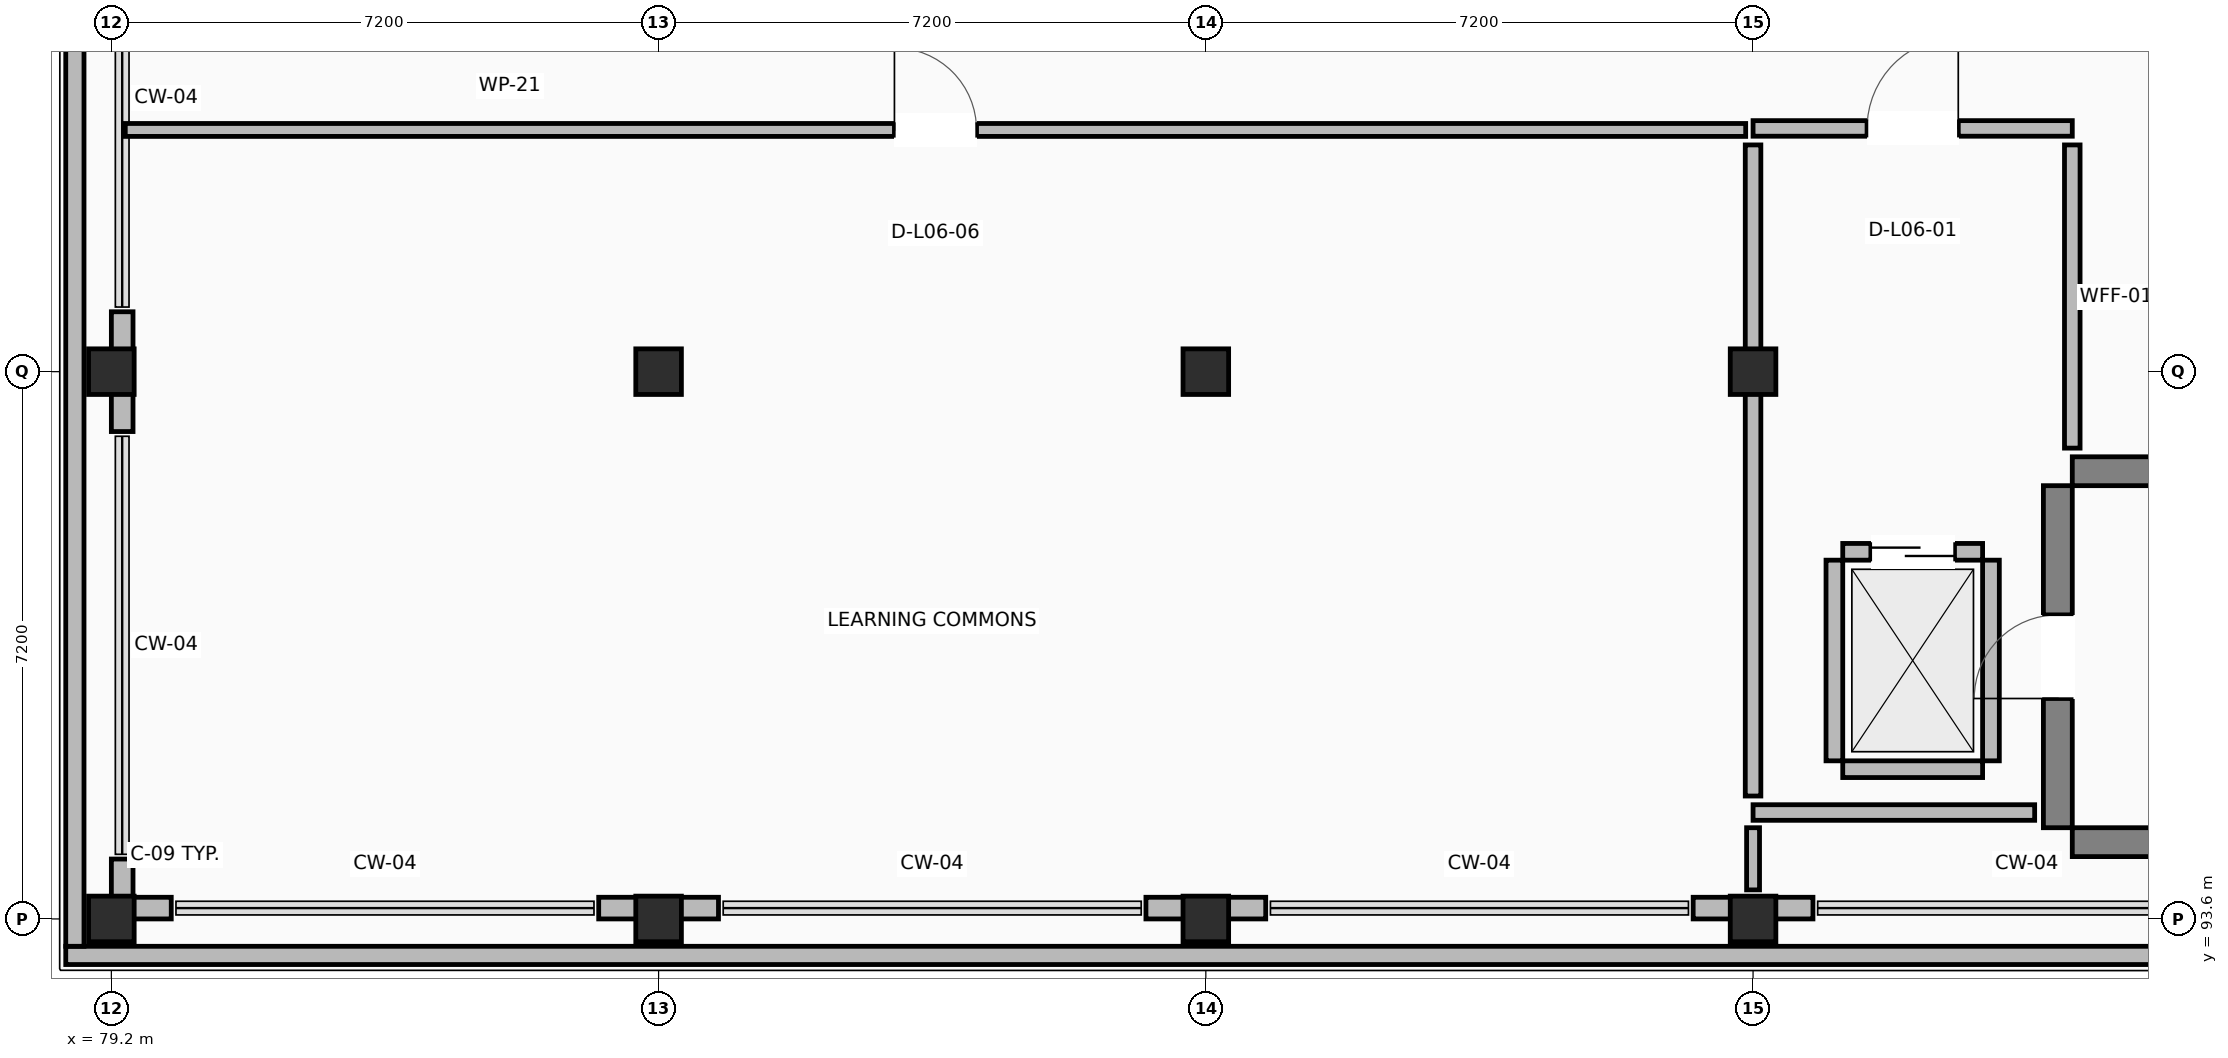
"""IFC4 building model, lengths in metres.
Left out: names, types, materials, properties, quantities, classifications, styles, units other than length and angle.
Written with IfcOpenShell. Run it as: python <this file> out.ifc"""

import sys

from ifc_helpers import new_model, si_unit, direction, frame, frame_2d, origin, origin_2d, place, context, subcontext, project, spatial, rectangle, extrude, element, fill, save


model = new_model("IFC4")
c1 = context("Model", 3, precision=1e-05, world=origin(), true_north=direction((0.0, 1.0)))
c2 = subcontext(c1, "Body", "Model", "MODEL_VIEW")
j1 = project(units=[si_unit("LENGTHUNIT", "METRE"), si_unit("PLANEANGLEUNIT", "RADIAN")], contexts=[c1])
p1 = place(None, origin())
s1 = spatial("IfcSite", under=j1, at=p1, CompositionType="ELEMENT")
p2 = place(p1, origin())
s2 = spatial("IfcBuilding", under=s1, at=p2, CompositionType="ELEMENT")
p3 = place(p2, frame((0.0, 0.0, 27.0)))
s3 = spatial("IfcBuildingStorey", under=s2, at=p3, CompositionType="ELEMENT", Elevation=27.0)
for number, where, z_axis, x_axis in (
    (1, (79.2, 93.6, 0.0), (0.0, 0.0, 1.0), (1.0, 0.0, 0.0)),
    (2, (79.2, 100.8, 0.0), (0.0, 0.0, 1.0), (1.0, 0.0, 0.0)),
    (3, (86.4, 93.6, 0.0), (0.0, 0.0, 1.0), (1.0, 0.0, 0.0)),
    (4, (86.4, 100.8, 0.0), (0.0, 0.0, 1.0), (1.0, 0.0, 0.0)),
    (5, (93.6, 93.6, 0.0), (0.0, 0.0, 1.0), (1.0, 0.0, 0.0)),
    (6, (93.6, 100.8, 0.0), (0.0, 0.0, 1.0), (1.0, 0.0, 0.0)),
    (7, (100.8, 93.6, 0.0), (0.0, 0.0, 1.0), (1.0, 0.0, 0.0)),
    (8, (100.8, 100.8, 0.0), (0.0, 0.0, 1.0), (1.0, 0.0, 0.0)),
):
    element("IfcColumn", number, at=place(p3, frame(where, z_axis=z_axis, x_axis=x_axis)), inside=s3, PredefinedType="COLUMN", context=c2, shape_type="SweptSolid", body=[
        extrude(rectangle(XDim=0.6, YDim=0.6, at=origin_2d()), origin(), (0.0, 0.0, 1.0), 3.92),
    ])
for number, where, z_axis, x_axis in (
    (9, (105.0, 94.61, 0.0), (0.0, 0.0, 1.0), (1.0, 0.0, 0.0)),
    (10, (105.0, 99.49, 0.0), (0.0, 0.0, 1.0), (1.0, 0.0, 0.0)),
):
    element("IfcWall", number, at=place(p3, frame(where, z_axis=z_axis, x_axis=x_axis)), inside=s3, PredefinedType="SHEAR", context=c2, shape_type="SweptSolid", body=[
        extrude(rectangle(XDim=9.5, YDim=0.38, at=frame_2d((4.75, 0.0))), origin(), (0.0, 0.0, 1.0), 3.92),
    ])
p4 = place(p3, frame((104.81, 94.8, 0.0), z_axis=(0.0, 0.0, 1.0), x_axis=(0.0, 1.0, 0.0)))
e11 = element("IfcWall", 11, at=p4, inside=s3, PredefinedType="SHEAR", context=c2, shape_type="SweptSolid", body=[
    extrude(rectangle(XDim=4.5, YDim=0.38, at=frame_2d((2.25, 0.0))), origin(), (0.0, 0.0, 1.0), 3.92),
])
p5 = place(p4, frame((1.7, 0.0, 0.0)))
e12 = element("IfcOpeningElement", 12, at=p5, cuts=e11, PredefinedType="OPENING", context=c2, shape_type="SweptSolid", body=[
    extrude(rectangle(XDim=1.1, YDim=2.15, at=frame_2d((0.55, 1.075))), frame((0.0, 0.2, 0.0), z_axis=(0.0, -1.0, 0.0), x_axis=(1.0, 0.0, 0.0)), (0.0, 0.0, 1.0), 0.4),
])
p6 = place(p3, frame((79.343, 101.588, 0.0), z_axis=(0.0, 0.0, 1.0), x_axis=(0.0, -1.0, 0.0)))
e13 = element("IfcWall", 13, at=p6, inside=s3, PredefinedType="STANDARD", context=c2, shape_type="SweptSolid", body=[
    extrude(rectangle(XDim=1.576, YDim=0.285, at=frame_2d((0.788, 0.0))), origin(), (0.0, 0.0, 1.0), 2.96),
])
p7 = place(p3, frame((79.343, 94.388, 0.0), z_axis=(0.0, 0.0, 1.0), x_axis=(0.0, -1.0, 0.0)))
e14 = element("IfcWall", 14, at=p7, inside=s3, PredefinedType="STANDARD", context=c2, shape_type="SweptSolid", body=[
    extrude(rectangle(XDim=0.503, YDim=0.285, at=frame_2d((0.251, 0.0))), origin(), (0.0, 0.0, 1.0), 2.96),
])
p8 = place(p3, frame((79.2, 93.742, 0.0), z_axis=(0.0, 0.0, 1.0), x_axis=(1.0, 0.0, 0.0)))
e15 = element("IfcWall", 15, at=p8, inside=s3, PredefinedType="STANDARD", context=c2, shape_type="SweptSolid", body=[
    extrude(rectangle(XDim=0.788, YDim=0.285, at=frame_2d((0.394, 0.0))), origin(), (0.0, 0.0, 1.0), 2.96),
])
for number, where, z_axis, x_axis in (
    (16, (85.612, 93.742, 0.0), (0.0, 0.0, 1.0), (1.0, 0.0, 0.0)),
    (17, (92.812, 93.742, 0.0), (0.0, 0.0, 1.0), (1.0, 0.0, 0.0)),
    (18, (100.012, 93.742, 0.0), (0.0, 0.0, 1.0), (1.0, 0.0, 0.0)),
):
    element("IfcWall", number, at=place(p3, frame(where, z_axis=z_axis, x_axis=x_axis)), inside=s3, PredefinedType="STANDARD", context=c2, shape_type="SweptSolid", body=[
        extrude(rectangle(XDim=1.576, YDim=0.285, at=frame_2d((0.788, 0.0))), origin(), (0.0, 0.0, 1.0), 2.96),
    ])
p9 = place(p3, frame((136.44, 93.12, 0.0), z_axis=(0.0, 0.0, 1.0), x_axis=(-1.0, 0.0, 0.0)))
e19 = element("IfcWall", 19, at=p9, inside=s3, PredefinedType="PARAPET", context=c2, shape_type="SweptSolid", body=[
    extrude(rectangle(XDim=57.84, YDim=0.24, at=frame_2d((28.92, 0.0))), origin(), (0.0, 0.0, 1.0), 1.12),
])
p10 = place(p3, frame((78.72, 93.24, 0.0), z_axis=(0.0, 0.0, 1.0), x_axis=(0.0, 1.0, 0.0)))
e20 = element("IfcWall", 20, at=p10, inside=s3, PredefinedType="PARAPET", context=c2, shape_type="SweptSolid", body=[
    extrude(rectangle(XDim=22.32, YDim=0.24, at=frame_2d((11.16, 0.0))), origin(), (0.0, 0.0, 1.0), 1.12),
])
p11 = place(p3, frame((101.98, 95.57, 0.0), z_axis=(0.0, 0.0, 1.0), x_axis=(1.0, 0.0, 0.0)))
e21 = element("IfcWall", 21, at=p11, inside=s3, PredefinedType="STANDARD", context=c2, shape_type="SweptSolid", body=[
    extrude(rectangle(XDim=1.84, YDim=0.22, at=frame_2d((0.92, 0.0))), origin(), (0.0, 0.0, 1.0), 2.96),
])
p12 = place(p3, frame((101.98, 98.43, 0.0), z_axis=(0.0, 0.0, 1.0), x_axis=(1.0, 0.0, 0.0)))
e22 = element("IfcWall", 22, at=p12, inside=s3, PredefinedType="STANDARD", context=c2, shape_type="SweptSolid", body=[
    extrude(rectangle(XDim=1.84, YDim=0.22, at=frame_2d((0.92, 0.0))), origin(), (0.0, 0.0, 1.0), 2.96),
])
p13 = place(p12, frame((0.37, 0.0, 0.0)))
e23 = element("IfcOpeningElement", 23, at=p13, cuts=e22, PredefinedType="OPENING", context=c2, shape_type="SweptSolid", body=[
    extrude(rectangle(XDim=1.1, YDim=2.15, at=frame_2d((0.55, 1.075))), frame((0.0, 0.12, 0.0), z_axis=(0.0, -1.0, 0.0), x_axis=(1.0, 0.0, 0.0)), (0.0, 0.0, 1.0), 0.24),
])
for number, where, z_axis, x_axis in (
    (24, (101.87, 95.68, 0.0), (0.0, 0.0, 1.0), (0.0, 1.0, 0.0)),
    (25, (103.93, 95.68, 0.0), (0.0, 0.0, 1.0), (0.0, 1.0, 0.0)),
):
    element("IfcWall", number, at=place(p3, frame(where, z_axis=z_axis, x_axis=x_axis)), inside=s3, PredefinedType="STANDARD", context=c2, shape_type="SweptSolid", body=[
        extrude(rectangle(XDim=2.64, YDim=0.22, at=frame_2d((1.32, 0.0))), origin(), (0.0, 0.0, 1.0), 2.96),
    ])
p14 = place(p3, frame((100.8, 104.0, 0.0), z_axis=(0.0, 0.0, 1.0), x_axis=(1.0, 0.0, 0.0)))
e26 = element("IfcWall", 26, at=p14, inside=s3, PredefinedType="PARTITIONING", context=c2, shape_type="SweptSolid", body=[
    extrude(rectangle(XDim=4.2, YDim=0.205, at=frame_2d((2.1, 0.0))), origin(), (0.0, 0.0, 1.0), 2.96),
])
p15 = place(p14, frame((1.5, 0.0, 0.0)))
e27 = element("IfcOpeningElement", 27, at=p15, cuts=e26, PredefinedType="OPENING", context=c2, shape_type="SweptSolid", body=[
    extrude(rectangle(XDim=1.2, YDim=2.15, at=frame_2d((0.6, 1.075))), frame((0.0, 0.113, 0.0), z_axis=(0.0, -1.0, 0.0), x_axis=(1.0, 0.0, 0.0)), (0.0, 0.0, 1.0), 0.225),
])
p16 = place(p3, frame((105.0, 103.783, 0.0), z_axis=(0.0, 0.0, 1.0), x_axis=(0.0, -1.0, 0.0)))
e28 = element("IfcWall", 28, at=p16, inside=s3, PredefinedType="PARTITIONING", context=c2, shape_type="SweptSolid", body=[
    extrude(rectangle(XDim=3.989, YDim=0.205, at=frame_2d((1.995, 0.0))), origin(), (0.0, 0.0, 1.0), 2.96),
])
p17 = place(p3, frame((104.505, 95.0, 0.0), z_axis=(0.0, 0.0, 1.0), x_axis=(-1.0, 0.0, 0.0)))
e29 = element("IfcWall", 29, at=p17, inside=s3, PredefinedType="PARTITIONING", context=c2, shape_type="SweptSolid", body=[
    extrude(rectangle(XDim=3.705, YDim=0.205, at=frame_2d((1.853, 0.0))), origin(), (0.0, 0.0, 1.0), 2.96),
])
p18 = place(p3, frame((100.8, 95.217, 0.0), z_axis=(0.0, 0.0, 1.0), x_axis=(0.0, 1.0, 0.0)))
e30 = element("IfcWall", 30, at=p18, inside=s3, PredefinedType="PARTITIONING", context=c2, shape_type="SweptSolid", body=[
    extrude(rectangle(XDim=8.566, YDim=0.205, at=frame_2d((4.283, 0.0))), origin(), (0.0, 0.0, 1.0), 2.96),
])
p19 = place(p3, frame((79.383, 103.98, 0.0), z_axis=(0.0, 0.0, 1.0), x_axis=(1.0, 0.0, 0.0)))
e31 = element("IfcWall", 31, at=p19, inside=s3, PredefinedType="PARTITIONING", context=c2, shape_type="SweptSolid", body=[
    extrude(rectangle(XDim=21.32, YDim=0.17, at=frame_2d((10.66, 0.0))), origin(), (0.0, 0.0, 1.0), 2.96),
])
p20 = place(p19, frame((10.12, 0.0, 0.0)))
e32 = element("IfcOpeningElement", 32, at=p20, cuts=e31, PredefinedType="OPENING", context=c2, shape_type="SweptSolid", body=[
    extrude(rectangle(XDim=1.08, YDim=2.15, at=frame_2d((0.54, 1.075))), frame((0.0, 0.095, 0.0), z_axis=(0.0, -1.0, 0.0), x_axis=(1.0, 0.0, 0.0)), (0.0, 0.0, 1.0), 0.19),
])
p21 = place(p3, frame((100.8, 94.8, 0.0), z_axis=(0.0, 0.0, 1.0), x_axis=(0.0, -1.0, 0.0)))
e33 = element("IfcWall", 33, at=p21, inside=s3, PredefinedType="PARTITIONING", context=c2, shape_type="SweptSolid", body=[
    extrude(rectangle(XDim=0.818, YDim=0.17, at=frame_2d((0.409, 0.0))), origin(), (0.0, 0.0, 1.0), 2.96),
])
p22 = place(p5, origin())
e34 = element("IfcDoor", 34, at=p22, inside=s3, OperationType="SINGLE_SWING_LEFT", PredefinedType="DOOR", context=c2, shape_type="SweptSolid", body=[
    extrude(rectangle(XDim=1.1, YDim=2.15, at=frame_2d((0.55, 1.075))), frame((0.0, 0.025, 0.0), z_axis=(0.0, -1.0, 0.0), x_axis=(1.0, 0.0, 0.0)), (0.0, 0.0, 1.0), 0.05),
])
fill(e12, e34)
p23 = place(p13, origin())
e35 = element("IfcDoor", 35, at=p23, inside=s3, OperationType="SLIDING_TO_LEFT", PredefinedType="DOOR", context=c2, shape_type="SweptSolid", body=[
    extrude(rectangle(XDim=1.1, YDim=2.15, at=frame_2d((0.55, 1.075))), frame((0.0, 0.025, 0.0), z_axis=(0.0, -1.0, 0.0), x_axis=(1.0, 0.0, 0.0)), (0.0, 0.0, 1.0), 0.05),
])
fill(e23, e35)
p24 = place(p15, origin())
e36 = element("IfcDoor", 36, at=p24, inside=s3, OperationType="SINGLE_SWING_RIGHT", PredefinedType="DOOR", context=c2, shape_type="SweptSolid", body=[
    extrude(rectangle(XDim=1.2, YDim=2.15, at=frame_2d((0.6, 1.075))), frame((0.0, 0.025, 0.0), z_axis=(0.0, -1.0, 0.0), x_axis=(1.0, 0.0, 0.0)), (0.0, 0.0, 1.0), 0.05),
])
fill(e27, e36)
p25 = place(p20, origin())
e37 = element("IfcDoor", 37, at=p25, inside=s3, OperationType="SINGLE_SWING_LEFT", PredefinedType="DOOR", context=c2, shape_type="SweptSolid", body=[
    extrude(rectangle(XDim=1.08, YDim=2.15, at=frame_2d((0.54, 1.075))), frame((0.0, 0.025, 0.0), z_axis=(0.0, -1.0, 0.0), x_axis=(1.0, 0.0, 0.0)), (0.0, 0.0, 1.0), 0.05),
])
fill(e32, e37)
save(model, sys.argv[1])
